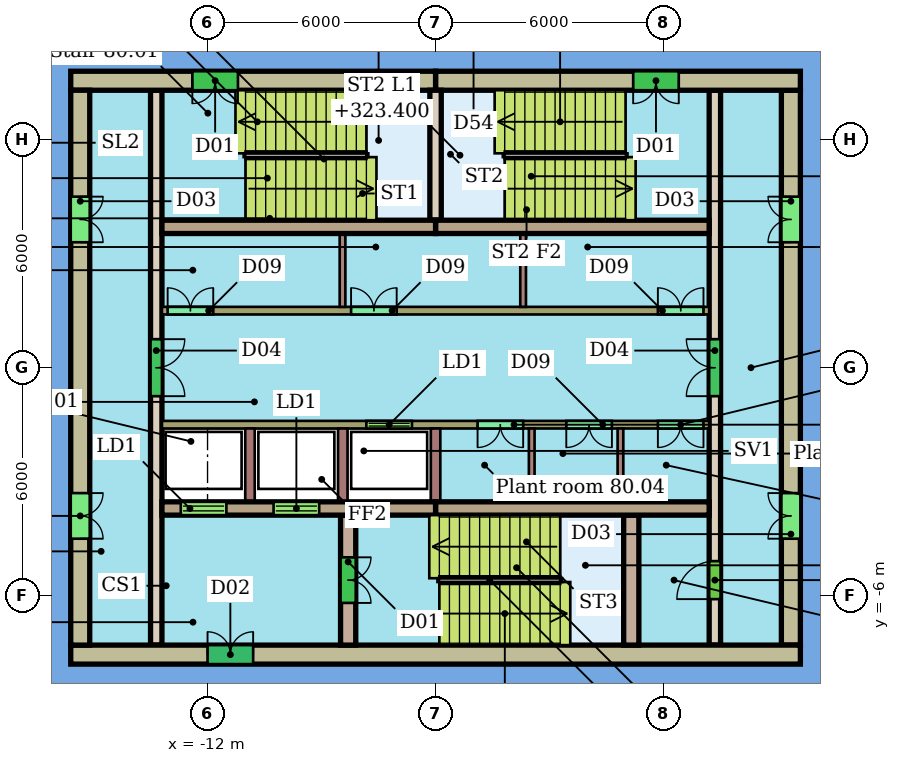
"""IFC4 building model, lengths in metres.
Left out: names, types, materials, properties, quantities, classifications, styles, units other than length and angle.
Written with IfcOpenShell. Run it as: python <this file> out.ifc"""

import sys

from ifc_helpers import new_model, si_unit, direction, frame, frame_2d, origin, place, context, subcontext, project, spatial, rectangle, extrude, element, fill, save


model = new_model("IFC4")
c1 = context("Model", 3, precision=1e-05, world=origin(), true_north=direction((0.0, 1.0)))
c2 = subcontext(c1, "Body", "Model", "MODEL_VIEW")
j1 = project(units=[si_unit("LENGTHUNIT", "METRE"), si_unit("PLANEANGLEUNIT", "RADIAN")], contexts=[c1])
p1 = place(None, origin())
s1 = spatial("IfcSite", under=j1, at=p1, CompositionType="ELEMENT")
p2 = place(p1, origin())
s2 = spatial("IfcBuilding", under=s1, at=p2, CompositionType="ELEMENT")
p3 = place(p2, frame((0.0, 0.0, 321.3)))
s3 = spatial("IfcBuildingStorey", under=s2, at=p3, CompositionType="ELEMENT", Elevation=321.3)
p4 = place(p3, frame((3.6, 7.55, 0.0), z_axis=(0.0, 0.0, 1.0), x_axis=(-1.0, 0.0, 0.0)))
e1 = element("IfcWall", 1, at=p4, inside=s3, PredefinedType="SHEAR", context=c2, shape_type="SweptSolid", body=[
    extrude(rectangle(XDim=9.6, YDim=0.5, at=frame_2d((4.8, 0.0))), origin(), (0.0, 0.0, 1.0), 3.9),
])
p5 = place(p4, frame((3.2, 0.0, 0.0)))
e2 = element("IfcOpeningElement", 2, at=p5, cuts=e1, PredefinedType="OPENING", context=c2, shape_type="SweptSolid", body=[
    extrude(rectangle(XDim=1.2, YDim=2.1, at=frame_2d((0.6, 1.05))), frame((0.0, 0.26, 0.0), z_axis=(0.0, -1.0, 0.0), x_axis=(1.0, 0.0, 0.0)), (0.0, 0.0, 1.0), 0.52),
])
p6 = place(p3, frame((-6.0, 7.55, 0.0), z_axis=(0.0, 0.0, 1.0), x_axis=(-1.0, 0.0, 0.0)))
e3 = element("IfcWall", 3, at=p6, inside=s3, PredefinedType="SHEAR", context=c2, shape_type="SweptSolid", body=[
    extrude(rectangle(XDim=9.6, YDim=0.5, at=frame_2d((4.8, 0.0))), origin(), (0.0, 0.0, 1.0), 3.9),
])
p7 = place(p6, frame((5.2, 0.0, 0.0)))
e4 = element("IfcOpeningElement", 4, at=p7, cuts=e3, PredefinedType="OPENING", context=c2, shape_type="SweptSolid", body=[
    extrude(rectangle(XDim=1.2, YDim=2.1, at=frame_2d((0.6, 1.05))), frame((0.0, 0.26, 0.0), z_axis=(0.0, -1.0, 0.0), x_axis=(1.0, 0.0, 0.0)), (0.0, 0.0, 1.0), 0.52),
])
p8 = place(p3, frame((-15.6, -7.55, 0.0), z_axis=(0.0, 0.0, 1.0), x_axis=(1.0, 0.0, 0.0)))
e5 = element("IfcWall", 5, at=p8, inside=s3, PredefinedType="SHEAR", context=c2, shape_type="SweptSolid", body=[
    extrude(rectangle(XDim=19.2, YDim=0.5, at=frame_2d((9.6, 0.0))), origin(), (0.0, 0.0, 1.0), 3.9),
])
p9 = place(p8, frame((3.6, 0.0, 0.0)))
e6 = element("IfcOpeningElement", 6, at=p9, cuts=e5, PredefinedType="OPENING", context=c2, shape_type="SweptSolid", body=[
    extrude(rectangle(XDim=1.2, YDim=2.1, at=frame_2d((0.6, 1.05))), frame((0.0, 0.26, 0.0), z_axis=(0.0, -1.0, 0.0), x_axis=(1.0, 0.0, 0.0)), (0.0, 0.0, 1.0), 0.52),
])
p10 = place(p3, frame((-15.35, 7.3, 0.0), z_axis=(0.0, 0.0, 1.0), x_axis=(0.0, -1.0, 0.0)))
e7 = element("IfcWall", 7, at=p10, inside=s3, PredefinedType="SHEAR", context=c2, shape_type="SweptSolid", body=[
    extrude(rectangle(XDim=14.6, YDim=0.5, at=frame_2d((7.3, 0.0))), origin(), (0.0, 0.0, 1.0), 3.9),
])
p11 = place(p10, frame((10.6, 0.0, 0.0)))
e8 = element("IfcOpeningElement", 8, at=p11, cuts=e7, PredefinedType="OPENING", context=c2, shape_type="SweptSolid", body=[
    extrude(rectangle(XDim=1.2, YDim=2.1, at=frame_2d((0.6, 1.05))), frame((0.0, 0.26, 0.0), z_axis=(0.0, -1.0, 0.0), x_axis=(1.0, 0.0, 0.0)), (0.0, 0.0, 1.0), 0.52),
])
p12 = place(p10, frame((2.8, 0.0, 0.0)))
e9 = element("IfcOpeningElement", 9, at=p12, cuts=e7, PredefinedType="OPENING", context=c2, shape_type="SweptSolid", body=[
    extrude(rectangle(XDim=1.2, YDim=2.1, at=frame_2d((0.6, 1.05))), frame((0.0, 0.26, 0.0), z_axis=(0.0, -1.0, 0.0), x_axis=(1.0, 0.0, 0.0)), (0.0, 0.0, 1.0), 0.52),
])
p13 = place(p3, frame((3.35, -7.3, 0.0), z_axis=(0.0, 0.0, 1.0), x_axis=(0.0, 1.0, 0.0)))
e10 = element("IfcWall", 10, at=p13, inside=s3, PredefinedType="SHEAR", context=c2, shape_type="SweptSolid", body=[
    extrude(rectangle(XDim=14.6, YDim=0.5, at=frame_2d((7.3, 0.0))), origin(), (0.0, 0.0, 1.0), 3.9),
])
p14 = place(p13, frame((2.8, 0.0, 0.0)))
e11 = element("IfcOpeningElement", 11, at=p14, cuts=e10, PredefinedType="OPENING", context=c2, shape_type="SweptSolid", body=[
    extrude(rectangle(XDim=1.2, YDim=2.1, at=frame_2d((0.6, 1.05))), frame((0.0, 0.26, 0.0), z_axis=(0.0, -1.0, 0.0), x_axis=(1.0, 0.0, 0.0)), (0.0, 0.0, 1.0), 0.52),
])
p15 = place(p13, frame((10.6, 0.0, 0.0)))
e12 = element("IfcOpeningElement", 12, at=p15, cuts=e10, PredefinedType="OPENING", context=c2, shape_type="SweptSolid", body=[
    extrude(rectangle(XDim=1.2, YDim=2.1, at=frame_2d((0.6, 1.05))), frame((0.0, 0.26, 0.0), z_axis=(0.0, -1.0, 0.0), x_axis=(1.0, 0.0, 0.0)), (0.0, 0.0, 1.0), 0.52),
])
for number, where, z_axis, x_axis in (
    (13, (-13.2, 3.705, 0.0), (0.0, 0.0, 1.0), (1.0, 0.0, 0.0)),
    (14, (-6.0, 3.705, 0.0), (0.0, 0.0, 1.0), (1.0, 0.0, 0.0)),
):
    element("IfcWall", number, at=place(p3, frame(where, z_axis=z_axis, x_axis=x_axis)), inside=s3, PredefinedType="SHEAR", context=c2, shape_type="SweptSolid", body=[
        extrude(rectangle(XDim=7.2, YDim=0.35, at=frame_2d((3.6, 0.0))), origin(), (0.0, 0.0, 1.0), 3.9),
    ])
p16 = place(p3, frame((-13.2, -3.705, 0.0), z_axis=(0.0, 0.0, 1.0), x_axis=(1.0, 0.0, 0.0)))
e15 = element("IfcWall", 15, at=p16, inside=s3, PredefinedType="SHEAR", context=c2, shape_type="SweptSolid", body=[
    extrude(rectangle(XDim=7.2, YDim=0.35, at=frame_2d((3.6, 0.0))), origin(), (0.0, 0.0, 1.0), 3.9),
])
p17 = place(p16, frame((0.496, 0.0, 0.0)))
e16 = element("IfcOpeningElement", 16, at=p17, cuts=e15, PredefinedType="OPENING", context=c2, shape_type="SweptSolid", body=[
    extrude(rectangle(XDim=1.2, YDim=2.1, at=frame_2d((0.6, 1.05))), frame((0.0, 0.185, 0.0), z_axis=(0.0, -1.0, 0.0), x_axis=(1.0, 0.0, 0.0)), (0.0, 0.0, 1.0), 0.37),
])
p18 = place(p16, frame((2.938, 0.0, 0.0)))
e17 = element("IfcOpeningElement", 17, at=p18, cuts=e15, PredefinedType="OPENING", context=c2, shape_type="SweptSolid", body=[
    extrude(rectangle(XDim=1.2, YDim=2.1, at=frame_2d((0.6, 1.05))), frame((0.0, 0.185, 0.0), z_axis=(0.0, -1.0, 0.0), x_axis=(1.0, 0.0, 0.0)), (0.0, 0.0, 1.0), 0.37),
])
p19 = place(p3, frame((-6.0, -3.705, 0.0), z_axis=(0.0, 0.0, 1.0), x_axis=(1.0, 0.0, 0.0)))
e18 = element("IfcWall", 18, at=p19, inside=s3, PredefinedType="SHEAR", context=c2, shape_type="SweptSolid", body=[
    extrude(rectangle(XDim=7.2, YDim=0.35, at=frame_2d((3.6, 0.0))), origin(), (0.0, 0.0, 1.0), 3.9),
])
p20 = place(p3, frame((-13.35, 7.3, 0.0), z_axis=(0.0, 0.0, 1.0), x_axis=(0.0, -1.0, 0.0)))
e19 = element("IfcWall", 19, at=p20, inside=s3, PredefinedType="SHEAR", context=c2, shape_type="SweptSolid", body=[
    extrude(rectangle(XDim=14.6, YDim=0.3, at=frame_2d((7.3, 0.0))), origin(), (0.0, 0.0, 1.0), 3.9),
])
p21 = place(p20, frame((6.55, 0.0, 0.0)))
e20 = element("IfcOpeningElement", 20, at=p21, cuts=e19, PredefinedType="OPENING", context=c2, shape_type="SweptSolid", body=[
    extrude(rectangle(XDim=1.5, YDim=2.1, at=frame_2d((0.75, 1.05))), frame((0.0, 0.16, 0.0), z_axis=(0.0, -1.0, 0.0), x_axis=(1.0, 0.0, 0.0)), (0.0, 0.0, 1.0), 0.32),
])
p22 = place(p3, frame((1.35, -7.3, 0.0), z_axis=(0.0, 0.0, 1.0), x_axis=(0.0, 1.0, 0.0)))
e21 = element("IfcWall", 21, at=p22, inside=s3, PredefinedType="SHEAR", context=c2, shape_type="SweptSolid", body=[
    extrude(rectangle(XDim=14.6, YDim=0.3, at=frame_2d((7.3, 0.0))), origin(), (0.0, 0.0, 1.0), 3.9),
])
p23 = place(p22, frame((1.21, 0.0, 0.0)))
e22 = element("IfcOpeningElement", 22, at=p23, cuts=e21, PredefinedType="OPENING", context=c2, shape_type="SweptSolid", body=[
    extrude(rectangle(XDim=1.0, YDim=2.1, at=frame_2d((0.5, 1.05))), frame((0.0, 0.16, 0.0), z_axis=(0.0, -1.0, 0.0), x_axis=(1.0, 0.0, 0.0)), (0.0, 0.0, 1.0), 0.32),
])
p24 = place(p22, frame((6.55, 0.0, 0.0)))
e23 = element("IfcOpeningElement", 23, at=p24, cuts=e21, PredefinedType="OPENING", context=c2, shape_type="SweptSolid", body=[
    extrude(rectangle(XDim=1.5, YDim=2.1, at=frame_2d((0.75, 1.05))), frame((0.0, 0.16, 0.0), z_axis=(0.0, -1.0, 0.0), x_axis=(1.0, 0.0, 0.0)), (0.0, 0.0, 1.0), 0.32),
])
p25 = place(p3, frame((-13.2, 1.5, 0.0), z_axis=(0.0, 0.0, 1.0), x_axis=(1.0, 0.0, 0.0)))
e24 = element("IfcWall", 24, at=p25, inside=s3, PredefinedType="SHEAR", context=c2, shape_type="SweptSolid", body=[
    extrude(rectangle(XDim=14.4, YDim=0.2, at=frame_2d((7.2, 0.0))), origin(), (0.0, 0.0, 1.0), 3.9),
])
p26 = place(p25, frame((0.15, 0.0, 0.0)))
e25 = element("IfcOpeningElement", 25, at=p26, cuts=e24, PredefinedType="OPENING", context=c2, shape_type="SweptSolid", body=[
    extrude(rectangle(XDim=1.2, YDim=2.4, at=frame_2d((0.6, 1.2))), frame((0.0, 0.11, 0.0), z_axis=(0.0, -1.0, 0.0), x_axis=(1.0, 0.0, 0.0)), (0.0, 0.0, 1.0), 0.22),
])
p27 = place(p25, frame((4.977, 0.0, 0.0)))
e26 = element("IfcOpeningElement", 26, at=p27, cuts=e24, PredefinedType="OPENING", context=c2, shape_type="SweptSolid", body=[
    extrude(rectangle(XDim=1.2, YDim=2.4, at=frame_2d((0.6, 1.2))), frame((0.0, 0.11, 0.0), z_axis=(0.0, -1.0, 0.0), x_axis=(1.0, 0.0, 0.0)), (0.0, 0.0, 1.0), 0.22),
])
p28 = place(p25, frame((13.05, 0.0, 0.0)))
e27 = element("IfcOpeningElement", 27, at=p28, cuts=e24, PredefinedType="OPENING", context=c2, shape_type="SweptSolid", body=[
    extrude(rectangle(XDim=1.2, YDim=2.4, at=frame_2d((0.6, 1.2))), frame((0.0, 0.11, 0.0), z_axis=(0.0, -1.0, 0.0), x_axis=(1.0, 0.0, 0.0)), (0.0, 0.0, 1.0), 0.22),
])
p29 = place(p3, frame((1.2, -1.5, 0.0), z_axis=(0.0, 0.0, 1.0), x_axis=(-1.0, 0.0, 0.0)))
e28 = element("IfcWall", 28, at=p29, inside=s3, PredefinedType="SHEAR", context=c2, shape_type="SweptSolid", body=[
    extrude(rectangle(XDim=14.4, YDim=0.2, at=frame_2d((7.2, 0.0))), origin(), (0.0, 0.0, 1.0), 3.9),
])
p30 = place(p29, frame((7.821, 0.0, 0.0)))
e29 = element("IfcOpeningElement", 29, at=p30, cuts=e28, PredefinedType="OPENING", context=c2, shape_type="SweptSolid", body=[
    extrude(rectangle(XDim=1.2, YDim=2.1, at=frame_2d((0.6, 1.05))), frame((0.0, 0.11, 0.0), z_axis=(0.0, -1.0, 0.0), x_axis=(1.0, 0.0, 0.0)), (0.0, 0.0, 1.0), 0.22),
])
p31 = place(p29, frame((4.895, 0.0, 0.0)))
e30 = element("IfcOpeningElement", 30, at=p31, cuts=e28, PredefinedType="OPENING", context=c2, shape_type="SweptSolid", body=[
    extrude(rectangle(XDim=1.2, YDim=2.4, at=frame_2d((0.6, 1.2))), frame((0.0, 0.11, 0.0), z_axis=(0.0, -1.0, 0.0), x_axis=(1.0, 0.0, 0.0)), (0.0, 0.0, 1.0), 0.22),
])
p32 = place(p29, frame((2.56, 0.0, 0.0)))
e31 = element("IfcOpeningElement", 31, at=p32, cuts=e28, PredefinedType="OPENING", context=c2, shape_type="SweptSolid", body=[
    extrude(rectangle(XDim=1.2, YDim=2.4, at=frame_2d((0.6, 1.2))), frame((0.0, 0.11, 0.0), z_axis=(0.0, -1.0, 0.0), x_axis=(1.0, 0.0, 0.0)), (0.0, 0.0, 1.0), 0.22),
])
p33 = place(p29, frame((0.15, 0.0, 0.0)))
e32 = element("IfcOpeningElement", 32, at=p33, cuts=e28, PredefinedType="OPENING", context=c2, shape_type="SweptSolid", body=[
    extrude(rectangle(XDim=1.2, YDim=2.4, at=frame_2d((0.6, 1.2))), frame((0.0, 0.11, 0.0), z_axis=(0.0, -1.0, 0.0), x_axis=(1.0, 0.0, 0.0)), (0.0, 0.0, 1.0), 0.22),
])
p34 = place(p3, frame((-8.3, -3.88, 0.0), z_axis=(0.0, 0.0, 1.0), x_axis=(0.0, -1.0, 0.0)))
e33 = element("IfcWall", 33, at=p34, inside=s3, PredefinedType="SHEAR", context=c2, shape_type="SweptSolid", body=[
    extrude(rectangle(XDim=3.42, YDim=0.4, at=frame_2d((1.71, 0.0))), origin(), (0.0, 0.0, 1.0), 3.9),
])
p35 = place(p34, frame((1.11, 0.0, 0.0)))
e34 = element("IfcOpeningElement", 34, at=p35, cuts=e33, PredefinedType="OPENING", context=c2, shape_type="SweptSolid", body=[
    extrude(rectangle(XDim=1.2, YDim=2.1, at=frame_2d((0.6, 1.05))), frame((0.0, 0.21, 0.0), z_axis=(0.0, -1.0, 0.0), x_axis=(1.0, 0.0, 0.0)), (0.0, 0.0, 1.0), 0.42),
])
p36 = place(p3, frame((-0.85, -3.88, 0.0), z_axis=(0.0, 0.0, 1.0), x_axis=(0.0, -1.0, 0.0)))
e35 = element("IfcWall", 35, at=p36, inside=s3, PredefinedType="SHEAR", context=c2, shape_type="SweptSolid", body=[
    extrude(rectangle(XDim=3.42, YDim=0.4, at=frame_2d((1.71, 0.0))), origin(), (0.0, 0.0, 1.0), 3.9),
])
p37 = place(p3, frame((-6.0, 3.88, 0.0), z_axis=(0.0, 0.0, 1.0), x_axis=(0.0, 1.0, 0.0)))
e36 = element("IfcWall", 36, at=p37, inside=s3, PredefinedType="SHEAR", context=c2, shape_type="SweptSolid", body=[
    extrude(rectangle(XDim=3.42, YDim=0.3, at=frame_2d((1.71, 0.0))), origin(), (0.0, 0.0, 1.0), 3.9),
])
for number, where, z_axis, x_axis in (
    (37, (-8.448, 1.6, 0.0), (0.0, 0.0, 1.0), (0.0, 1.0, 0.0)),
    (38, (-3.696, 1.6, 0.0), (0.0, 0.0, 1.0), (0.0, 1.0, 0.0)),
):
    element("IfcWall", number, at=place(p3, frame(where, z_axis=z_axis, x_axis=x_axis)), inside=s3, PredefinedType="PARTITIONING", context=c2, shape_type="SweptSolid", body=[
        extrude(rectangle(XDim=1.93, YDim=0.15, at=frame_2d((0.965, 0.0))), origin(), (0.0, 0.0, 1.0), 3.9),
    ])
for number, where, z_axis, x_axis in (
    (39, (-10.883, -1.6, 0.0), (0.0, 0.0, 1.0), (0.0, -1.0, 0.0)),
    (40, (-8.442, -1.6, 0.0), (0.0, 0.0, 1.0), (0.0, -1.0, 0.0)),
    (41, (-6.0, -1.6, 0.0), (0.0, 0.0, 1.0), (0.0, -1.0, 0.0)),
):
    element("IfcWall", number, at=place(p3, frame(where, z_axis=z_axis, x_axis=x_axis)), inside=s3, PredefinedType="SHEAR", context=c2, shape_type="SweptSolid", body=[
        extrude(rectangle(XDim=1.93, YDim=0.25, at=frame_2d((0.965, 0.0))), origin(), (0.0, 0.0, 1.0), 3.9),
    ])
for number, where, z_axis, x_axis in (
    (42, (-3.469, -1.6, 0.0), (0.0, 0.0, 1.0), (0.0, -1.0, 0.0)),
    (43, (-1.135, -1.6, 0.0), (0.0, 0.0, 1.0), (0.0, -1.0, 0.0)),
):
    element("IfcWall", number, at=place(p3, frame(where, z_axis=z_axis, x_axis=x_axis)), inside=s3, PredefinedType="PARTITIONING", context=c2, shape_type="SweptSolid", body=[
        extrude(rectangle(XDim=1.93, YDim=0.15, at=frame_2d((0.965, 0.0))), origin(), (0.0, 0.0, 1.0), 3.9),
    ])
p38 = place(p5, origin())
e44 = element("IfcDoor", 44, at=p38, inside=s3, OperationType="DOUBLE_DOOR_SINGLE_SWING", PredefinedType="NOTDEFINED", context=c2, shape_type="SweptSolid", body=[
    extrude(rectangle(XDim=1.2, YDim=2.1, at=frame_2d((0.6, 1.05))), frame((0.0, 0.025, 0.0), z_axis=(0.0, -1.0, 0.0), x_axis=(1.0, 0.0, 0.0)), (0.0, 0.0, 1.0), 0.05),
])
fill(e2, e44)
p39 = place(p7, origin())
e45 = element("IfcDoor", 45, at=p39, inside=s3, OperationType="DOUBLE_DOOR_SINGLE_SWING", PredefinedType="NOTDEFINED", context=c2, shape_type="SweptSolid", body=[
    extrude(rectangle(XDim=1.2, YDim=2.1, at=frame_2d((0.6, 1.05))), frame((0.0, 0.025, 0.0), z_axis=(0.0, -1.0, 0.0), x_axis=(1.0, 0.0, 0.0)), (0.0, 0.0, 1.0), 0.05),
])
fill(e4, e45)
p40 = place(p9, origin())
e46 = element("IfcDoor", 46, at=p40, inside=s3, OperationType="DOUBLE_DOOR_SINGLE_SWING", PredefinedType="NOTDEFINED", context=c2, shape_type="SweptSolid", body=[
    extrude(rectangle(XDim=1.2, YDim=2.1, at=frame_2d((0.6, 1.05))), frame((0.0, 0.025, 0.0), z_axis=(0.0, -1.0, 0.0), x_axis=(1.0, 0.0, 0.0)), (0.0, 0.0, 1.0), 0.05),
])
fill(e6, e46)
p41 = place(p11, origin())
e47 = element("IfcDoor", 47, at=p41, inside=s3, OperationType="DOUBLE_DOOR_SINGLE_SWING", PredefinedType="NOTDEFINED", context=c2, shape_type="SweptSolid", body=[
    extrude(rectangle(XDim=1.2, YDim=2.1, at=frame_2d((0.6, 1.05))), frame((0.0, 0.025, 0.0), z_axis=(0.0, -1.0, 0.0), x_axis=(1.0, 0.0, 0.0)), (0.0, 0.0, 1.0), 0.05),
])
fill(e8, e47)
p42 = place(p12, origin())
e48 = element("IfcDoor", 48, at=p42, inside=s3, OperationType="DOUBLE_DOOR_SINGLE_SWING", PredefinedType="NOTDEFINED", context=c2, shape_type="SweptSolid", body=[
    extrude(rectangle(XDim=1.2, YDim=2.1, at=frame_2d((0.6, 1.05))), frame((0.0, 0.025, 0.0), z_axis=(0.0, -1.0, 0.0), x_axis=(1.0, 0.0, 0.0)), (0.0, 0.0, 1.0), 0.05),
])
fill(e9, e48)
p43 = place(p14, origin())
e49 = element("IfcDoor", 49, at=p43, inside=s3, OperationType="DOUBLE_DOOR_SINGLE_SWING", PredefinedType="NOTDEFINED", context=c2, shape_type="SweptSolid", body=[
    extrude(rectangle(XDim=1.2, YDim=2.1, at=frame_2d((0.6, 1.05))), frame((0.0, 0.025, 0.0), z_axis=(0.0, -1.0, 0.0), x_axis=(1.0, 0.0, 0.0)), (0.0, 0.0, 1.0), 0.05),
])
fill(e11, e49)
p44 = place(p15, origin())
e50 = element("IfcDoor", 50, at=p44, inside=s3, OperationType="DOUBLE_DOOR_SINGLE_SWING", PredefinedType="NOTDEFINED", context=c2, shape_type="SweptSolid", body=[
    extrude(rectangle(XDim=1.2, YDim=2.1, at=frame_2d((0.6, 1.05))), frame((0.0, 0.025, 0.0), z_axis=(0.0, -1.0, 0.0), x_axis=(1.0, 0.0, 0.0)), (0.0, 0.0, 1.0), 0.05),
])
fill(e12, e50)
p45 = place(p17, origin())
e51 = element("IfcDoor", 51, at=p45, inside=s3, OperationType="DOUBLE_DOOR_SLIDING", PredefinedType="NOTDEFINED", context=c2, shape_type="SweptSolid", body=[
    extrude(rectangle(XDim=1.2, YDim=2.1, at=frame_2d((0.6, 1.05))), frame((0.0, 0.025, 0.0), z_axis=(0.0, -1.0, 0.0), x_axis=(1.0, 0.0, 0.0)), (0.0, 0.0, 1.0), 0.05),
])
fill(e16, e51)
p46 = place(p18, origin())
e52 = element("IfcDoor", 52, at=p46, inside=s3, OperationType="DOUBLE_DOOR_SLIDING", PredefinedType="NOTDEFINED", context=c2, shape_type="SweptSolid", body=[
    extrude(rectangle(XDim=1.2, YDim=2.1, at=frame_2d((0.6, 1.05))), frame((0.0, 0.025, 0.0), z_axis=(0.0, -1.0, 0.0), x_axis=(1.0, 0.0, 0.0)), (0.0, 0.0, 1.0), 0.05),
])
fill(e17, e52)
p47 = place(p21, origin())
e53 = element("IfcDoor", 53, at=p47, inside=s3, OperationType="DOUBLE_DOOR_SINGLE_SWING", PredefinedType="NOTDEFINED", context=c2, shape_type="SweptSolid", body=[
    extrude(rectangle(XDim=1.5, YDim=2.1, at=frame_2d((0.75, 1.05))), frame((0.0, 0.025, 0.0), z_axis=(0.0, -1.0, 0.0), x_axis=(1.0, 0.0, 0.0)), (0.0, 0.0, 1.0), 0.05),
])
fill(e20, e53)
p48 = place(p23, origin())
e54 = element("IfcDoor", 54, at=p48, inside=s3, OperationType="SINGLE_SWING_LEFT", PredefinedType="NOTDEFINED", context=c2, shape_type="SweptSolid", body=[
    extrude(rectangle(XDim=1.0, YDim=2.1, at=frame_2d((0.5, 1.05))), frame((0.0, 0.025, 0.0), z_axis=(0.0, -1.0, 0.0), x_axis=(1.0, 0.0, 0.0)), (0.0, 0.0, 1.0), 0.05),
])
fill(e22, e54)
p49 = place(p24, origin())
e55 = element("IfcDoor", 55, at=p49, inside=s3, OperationType="DOUBLE_DOOR_SINGLE_SWING", PredefinedType="NOTDEFINED", context=c2, shape_type="SweptSolid", body=[
    extrude(rectangle(XDim=1.5, YDim=2.1, at=frame_2d((0.75, 1.05))), frame((0.0, 0.025, 0.0), z_axis=(0.0, -1.0, 0.0), x_axis=(1.0, 0.0, 0.0)), (0.0, 0.0, 1.0), 0.05),
])
fill(e23, e55)
p50 = place(p26, origin())
e56 = element("IfcDoor", 56, at=p50, inside=s3, OperationType="DOUBLE_DOOR_SINGLE_SWING", PredefinedType="NOTDEFINED", context=c2, shape_type="SweptSolid", body=[
    extrude(rectangle(XDim=1.2, YDim=2.4, at=frame_2d((0.6, 1.2))), frame((0.0, 0.025, 0.0), z_axis=(0.0, -1.0, 0.0), x_axis=(1.0, 0.0, 0.0)), (0.0, 0.0, 1.0), 0.05),
])
fill(e25, e56)
p51 = place(p27, origin())
e57 = element("IfcDoor", 57, at=p51, inside=s3, OperationType="DOUBLE_DOOR_SINGLE_SWING", PredefinedType="NOTDEFINED", context=c2, shape_type="SweptSolid", body=[
    extrude(rectangle(XDim=1.2, YDim=2.4, at=frame_2d((0.6, 1.2))), frame((0.0, 0.025, 0.0), z_axis=(0.0, -1.0, 0.0), x_axis=(1.0, 0.0, 0.0)), (0.0, 0.0, 1.0), 0.05),
])
fill(e26, e57)
p52 = place(p28, origin())
e58 = element("IfcDoor", 58, at=p52, inside=s3, OperationType="DOUBLE_DOOR_SINGLE_SWING", PredefinedType="NOTDEFINED", context=c2, shape_type="SweptSolid", body=[
    extrude(rectangle(XDim=1.2, YDim=2.4, at=frame_2d((0.6, 1.2))), frame((0.0, 0.025, 0.0), z_axis=(0.0, -1.0, 0.0), x_axis=(1.0, 0.0, 0.0)), (0.0, 0.0, 1.0), 0.05),
])
fill(e27, e58)
p53 = place(p30, origin())
e59 = element("IfcDoor", 59, at=p53, inside=s3, OperationType="DOUBLE_DOOR_SLIDING", PredefinedType="NOTDEFINED", context=c2, shape_type="SweptSolid", body=[
    extrude(rectangle(XDim=1.2, YDim=2.1, at=frame_2d((0.6, 1.05))), frame((0.0, 0.025, 0.0), z_axis=(0.0, -1.0, 0.0), x_axis=(1.0, 0.0, 0.0)), (0.0, 0.0, 1.0), 0.05),
])
fill(e29, e59)
p54 = place(p31, origin())
e60 = element("IfcDoor", 60, at=p54, inside=s3, OperationType="DOUBLE_DOOR_SINGLE_SWING", PredefinedType="NOTDEFINED", context=c2, shape_type="SweptSolid", body=[
    extrude(rectangle(XDim=1.2, YDim=2.4, at=frame_2d((0.6, 1.2))), frame((0.0, 0.025, 0.0), z_axis=(0.0, -1.0, 0.0), x_axis=(1.0, 0.0, 0.0)), (0.0, 0.0, 1.0), 0.05),
])
fill(e30, e60)
p55 = place(p32, origin())
e61 = element("IfcDoor", 61, at=p55, inside=s3, OperationType="DOUBLE_DOOR_SINGLE_SWING", PredefinedType="NOTDEFINED", context=c2, shape_type="SweptSolid", body=[
    extrude(rectangle(XDim=1.2, YDim=2.4, at=frame_2d((0.6, 1.2))), frame((0.0, 0.025, 0.0), z_axis=(0.0, -1.0, 0.0), x_axis=(1.0, 0.0, 0.0)), (0.0, 0.0, 1.0), 0.05),
])
fill(e31, e61)
p56 = place(p33, origin())
e62 = element("IfcDoor", 62, at=p56, inside=s3, OperationType="DOUBLE_DOOR_SINGLE_SWING", PredefinedType="NOTDEFINED", context=c2, shape_type="SweptSolid", body=[
    extrude(rectangle(XDim=1.2, YDim=2.4, at=frame_2d((0.6, 1.2))), frame((0.0, 0.025, 0.0), z_axis=(0.0, -1.0, 0.0), x_axis=(1.0, 0.0, 0.0)), (0.0, 0.0, 1.0), 0.05),
])
fill(e32, e62)
p57 = place(p35, origin())
e63 = element("IfcDoor", 63, at=p57, inside=s3, OperationType="DOUBLE_DOOR_SINGLE_SWING", PredefinedType="NOTDEFINED", context=c2, shape_type="SweptSolid", body=[
    extrude(rectangle(XDim=1.2, YDim=2.1, at=frame_2d((0.6, 1.05))), frame((0.0, 0.025, 0.0), z_axis=(0.0, -1.0, 0.0), x_axis=(1.0, 0.0, 0.0)), (0.0, 0.0, 1.0), 0.05),
])
fill(e34, e63)
save(model, sys.argv[1])
